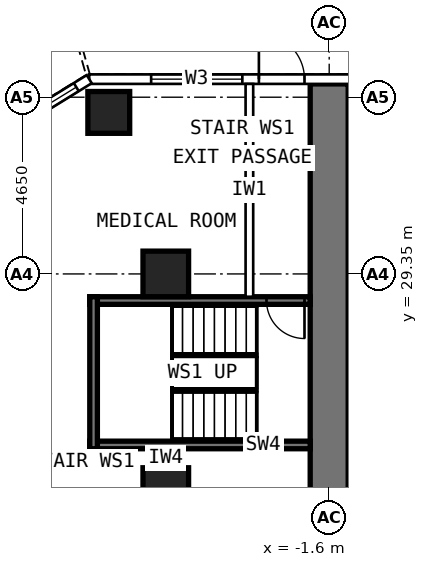
"""IFC4 building model, lengths in metres.
Left out: names, types, materials, properties, quantities, classifications, styles, units other than length and angle.
Written with IfcOpenShell. Run it as: python <this file> out.ifc"""

import sys

from ifc_helpers import new_model, si_unit, direction, frame, frame_2d, origin, origin_2d, place, context, subcontext, project, spatial, rectangle, extrude, element, fill, save


model = new_model("IFC4")
c1 = context("Model", 3, precision=1e-05, world=origin(), true_north=direction((0.0, 1.0)))
c2 = subcontext(c1, "Body", "Model", "MODEL_VIEW")
j1 = project(units=[si_unit("LENGTHUNIT", "METRE"), si_unit("PLANEANGLEUNIT", "RADIAN")], contexts=[c1])
p1 = place(None, origin())
s1 = spatial("IfcSite", under=j1, at=p1, CompositionType="ELEMENT")
p2 = place(p1, origin())
s2 = spatial("IfcBuilding", under=s1, at=p2, CompositionType="ELEMENT")
p3 = place(p2, origin())
s3 = spatial("IfcBuildingStorey", under=s2, at=p3, CompositionType="ELEMENT", Elevation=0.0)
p4 = place(p3, frame((-7.4, 33.6, 0.0), z_axis=(0.0, 0.0, 1.0), x_axis=(0.0, 1.0, 0.0)))
e1 = element("IfcColumn", 1, at=p4, inside=s3, PredefinedType="COLUMN", context=c2, shape_type="SweptSolid", body=[
    extrude(rectangle(XDim=1.1, YDim=1.1, at=origin_2d()), origin(), (0.0, 0.0, 1.0), 6.0),
])
for number, where, z_axis, x_axis in (
    (2, (-5.9, 23.65, 0.0), (0.0, 0.0, 1.0), (0.0, 1.0, 0.0)),
    (3, (-5.9, 29.35, 0.0), (0.0, 0.0, 1.0), (0.0, 1.0, 0.0)),
):
    element("IfcColumn", number, at=place(p3, frame(where, z_axis=z_axis, x_axis=x_axis)), inside=s3, PredefinedType="COLUMN", context=c2, shape_type="SweptSolid", body=[
        extrude(rectangle(XDim=1.2, YDim=1.2, at=origin_2d()), origin(), (0.0, 0.0, 1.0), 6.0),
    ])
p5 = place(p3, frame((-1.6, 23.65, 0.0), z_axis=(0.0, 0.0, 1.0), x_axis=(0.0, 1.0, 0.0)))
e4 = element("IfcWall", 4, at=p5, inside=s3, PredefinedType="SHEAR", context=c2, shape_type="SweptSolid", body=[
    extrude(rectangle(XDim=10.7, YDim=1.0, at=frame_2d((5.35, 0.0))), origin(), (0.0, 0.0, 1.0), 6.0),
])
p6 = place(p3, frame((7.915, 34.475, 0.0), z_axis=(0.0, 0.0, 1.0), x_axis=(-1.0, 0.0, 0.0)))
e5 = element("IfcWall", 5, at=p6, inside=s3, PredefinedType="SOLIDWALL", context=c2, shape_type="SweptSolid", body=[
    extrude(rectangle(XDim=15.829, YDim=0.25, at=frame_2d((7.915, 0.0))), origin(), (0.0, 0.0, 1.0), 5.7),
])
p7 = place(p6, frame((7.015, 0.0, 0.0)))
e6 = element("IfcOpeningElement", 6, at=p7, cuts=e5, PredefinedType="OPENING", context=c2, shape_type="SweptSolid", body=[
    extrude(rectangle(XDim=1.8, YDim=2.4, at=frame_2d((0.9, 1.2))), frame((0.0, 0.137, 0.0), z_axis=(0.0, -1.0, 0.0), x_axis=(1.0, 0.0, 0.0)), (0.0, 0.0, 1.0), 0.274),
])
p8 = place(p6, frame((0.4, 0.0, 0.6)))
e7 = element("IfcOpeningElement", 7, at=p8, cuts=e5, PredefinedType="OPENING", context=c2, shape_type="SweptSolid", body=[
    extrude(rectangle(XDim=2.4, YDim=3.6, at=frame_2d((1.2, 1.8))), frame((0.0, 0.137, 0.0), z_axis=(0.0, -1.0, 0.0), x_axis=(1.0, 0.0, 0.0)), (0.0, 0.0, 1.0), 0.274),
])
p9 = place(p6, frame((3.25, 0.0, 0.6)))
e8 = element("IfcOpeningElement", 8, at=p9, cuts=e5, PredefinedType="OPENING", context=c2, shape_type="SweptSolid", body=[
    extrude(rectangle(XDim=2.4, YDim=3.6, at=frame_2d((1.2, 1.8))), frame((0.0, 0.137, 0.0), z_axis=(0.0, -1.0, 0.0), x_axis=(1.0, 0.0, 0.0)), (0.0, 0.0, 1.0), 0.274),
])
p10 = place(p6, frame((11.8, 0.0, 0.6)))
e9 = element("IfcOpeningElement", 9, at=p10, cuts=e5, PredefinedType="OPENING", context=c2, shape_type="SweptSolid", body=[
    extrude(rectangle(XDim=2.4, YDim=3.6, at=frame_2d((1.2, 1.8))), frame((0.0, 0.137, 0.0), z_axis=(0.0, -1.0, 0.0), x_axis=(1.0, 0.0, 0.0)), (0.0, 0.0, 1.0), 0.274),
])
p11 = place(p6, frame((10.165, 0.0, 0.0)))
e10 = element("IfcOpeningElement", 10, at=p11, cuts=e5, PredefinedType="OPENING", context=c2, shape_type="SweptSolid", body=[
    extrude(rectangle(XDim=1.2, YDim=2.1, at=frame_2d((0.6, 1.05))), frame((0.0, 0.137, 0.0), z_axis=(0.0, -1.0, 0.0), x_axis=(1.0, 0.0, 0.0)), (0.0, 0.0, 1.0), 0.274),
])
p12 = place(p3, frame((-7.915, 34.475, 0.0), z_axis=(0.0, 0.0, 1.0), x_axis=(-0.851479708041, -0.524387554004, 0.0)))
e11 = element("IfcWall", 11, at=p12, inside=s3, PredefinedType="SOLIDWALL", context=c2, shape_type="SweptSolid", body=[
    extrude(rectangle(XDim=9.013, YDim=0.25, at=frame_2d((4.507, 0.0))), origin(), (0.0, 0.0, 1.0), 5.7),
])
p13 = place(p12, frame((3.607, 0.0, 0.0)))
e12 = element("IfcOpeningElement", 12, at=p13, cuts=e11, PredefinedType="OPENING", context=c2, shape_type="SweptSolid", body=[
    extrude(rectangle(XDim=1.8, YDim=2.4, at=frame_2d((0.9, 1.2))), frame((0.0, 0.137, 0.0), z_axis=(0.0, -1.0, 0.0), x_axis=(1.0, 0.0, 0.0)), (0.0, 0.0, 1.0), 0.274),
])
p14 = place(p12, frame((0.4, 0.0, 0.6)))
e13 = element("IfcOpeningElement", 13, at=p14, cuts=e11, PredefinedType="OPENING", context=c2, shape_type="SweptSolid", body=[
    extrude(rectangle(XDim=2.4, YDim=3.6, at=frame_2d((1.2, 1.8))), frame((0.0, 0.137, 0.0), z_axis=(0.0, -1.0, 0.0), x_axis=(1.0, 0.0, 0.0)), (0.0, 0.0, 1.0), 0.274),
])
p15 = place(p3, frame((-5.9, 24.25, 0.0), z_axis=(0.0, 0.0, 1.0), x_axis=(0.0, 1.0, 0.0)))
e14 = element("IfcWall", 14, at=p15, inside=s3, PredefinedType="PARTITIONING", context=c2, shape_type="SweptSolid", body=[
    extrude(rectangle(XDim=0.5, YDim=0.15, at=frame_2d((0.25, 0.0))), origin(), (0.0, 0.0, 1.0), 5.7),
])
p16 = place(p3, frame((-2.1, 24.85, 0.0), z_axis=(0.0, 0.0, 1.0), x_axis=(-1.0, 0.0, 0.0)))
e15 = element("IfcWall", 15, at=p16, inside=s3, PredefinedType="SHEAR", context=c2, shape_type="SweptSolid", body=[
    extrude(rectangle(XDim=5.8, YDim=0.2, at=frame_2d((2.9, 0.0))), origin(), (0.0, 0.0, 1.0), 5.68),
])
p17 = place(p3, frame((-2.1, 28.65, 0.0), z_axis=(0.0, 0.0, 1.0), x_axis=(-1.0, 0.0, 0.0)))
e16 = element("IfcWall", 16, at=p17, inside=s3, PredefinedType="SHEAR", context=c2, shape_type="SweptSolid", body=[
    extrude(rectangle(XDim=5.8, YDim=0.2, at=frame_2d((2.9, 0.0))), origin(), (0.0, 0.0, 1.0), 5.68),
])
p18 = place(p17, frame((0.15, 0.0, 0.0)))
e17 = element("IfcOpeningElement", 17, at=p18, cuts=e16, PredefinedType="OPENING", context=c2, shape_type="SweptSolid", body=[
    extrude(rectangle(XDim=1.0, YDim=2.1, at=frame_2d((0.5, 1.05))), frame((0.0, 0.112, 0.0), z_axis=(0.0, -1.0, 0.0), x_axis=(1.0, 0.0, 0.0)), (0.0, 0.0, 1.0), 0.224),
])
p19 = place(p3, frame((-7.8, 24.75, 0.0), z_axis=(0.0, 0.0, 1.0), x_axis=(0.0, 1.0, 0.0)))
e18 = element("IfcWall", 18, at=p19, inside=s3, PredefinedType="SHEAR", context=c2, shape_type="SweptSolid", body=[
    extrude(rectangle(XDim=4.0, YDim=0.2, at=frame_2d((2.0, 0.0))), origin(), (0.0, 0.0, 1.0), 5.68),
])
p20 = place(p3, frame((-3.7, 28.75, 0.0), z_axis=(0.0, 0.0, 1.0), x_axis=(0.0, 1.0, 0.0)))
e19 = element("IfcWall", 19, at=p20, inside=s3, PredefinedType="PARTITIONING", context=c2, shape_type="SweptSolid", body=[
    extrude(rectangle(XDim=5.6, YDim=0.2, at=frame_2d((2.8, 0.0))), origin(), (0.0, 0.0, 1.0), 5.68),
])
p21 = place(p10, origin())
e20 = element("IfcWindow", 20, at=p21, inside=s3, PartitioningType="SINGLE_PANEL", PredefinedType="WINDOW", context=c2, shape_type="SweptSolid", body=[
    extrude(rectangle(XDim=2.4, YDim=3.6, at=frame_2d((1.2, 1.8))), frame((0.0, 0.03, 0.0), z_axis=(0.0, -1.0, 0.0), x_axis=(1.0, 0.0, 0.0)), (0.0, 0.0, 1.0), 0.06),
])
fill(e9, e20)
p22 = place(p14, origin())
e21 = element("IfcWindow", 21, at=p22, inside=s3, PartitioningType="SINGLE_PANEL", PredefinedType="WINDOW", context=c2, shape_type="SweptSolid", body=[
    extrude(rectangle(XDim=2.4, YDim=3.6, at=frame_2d((1.2, 1.8))), frame((0.0, 0.03, 0.0), z_axis=(0.0, -1.0, 0.0), x_axis=(1.0, 0.0, 0.0)), (0.0, 0.0, 1.0), 0.06),
])
fill(e13, e21)
p23 = place(p18, origin())
e22 = element("IfcDoor", 22, at=p23, inside=s3, OperationType="SINGLE_SWING_LEFT", PredefinedType="DOOR", context=c2, shape_type="SweptSolid", body=[
    extrude(rectangle(XDim=1.0, YDim=2.1, at=frame_2d((0.5, 1.05))), frame((0.0, 0.025, 0.0), z_axis=(0.0, -1.0, 0.0), x_axis=(1.0, 0.0, 0.0)), (0.0, 0.0, 1.0), 0.05),
])
fill(e17, e22)
p24 = place(p11, frame((1.2, 0.0, 0.0), z_axis=(0.0, 0.0, 1.0), x_axis=(-1.0, 0.0, 0.0)))
e23 = element("IfcDoor", 23, at=p24, inside=s3, OperationType="SINGLE_SWING_LEFT", PredefinedType="DOOR", context=c2, shape_type="SweptSolid", body=[
    extrude(rectangle(XDim=1.2, YDim=2.1, at=frame_2d((0.6, 1.05))), frame((0.0, 0.025, 0.0), z_axis=(0.0, -1.0, 0.0), x_axis=(1.0, 0.0, 0.0)), (0.0, 0.0, 1.0), 0.05),
])
fill(e10, e23)
save(model, sys.argv[1])
